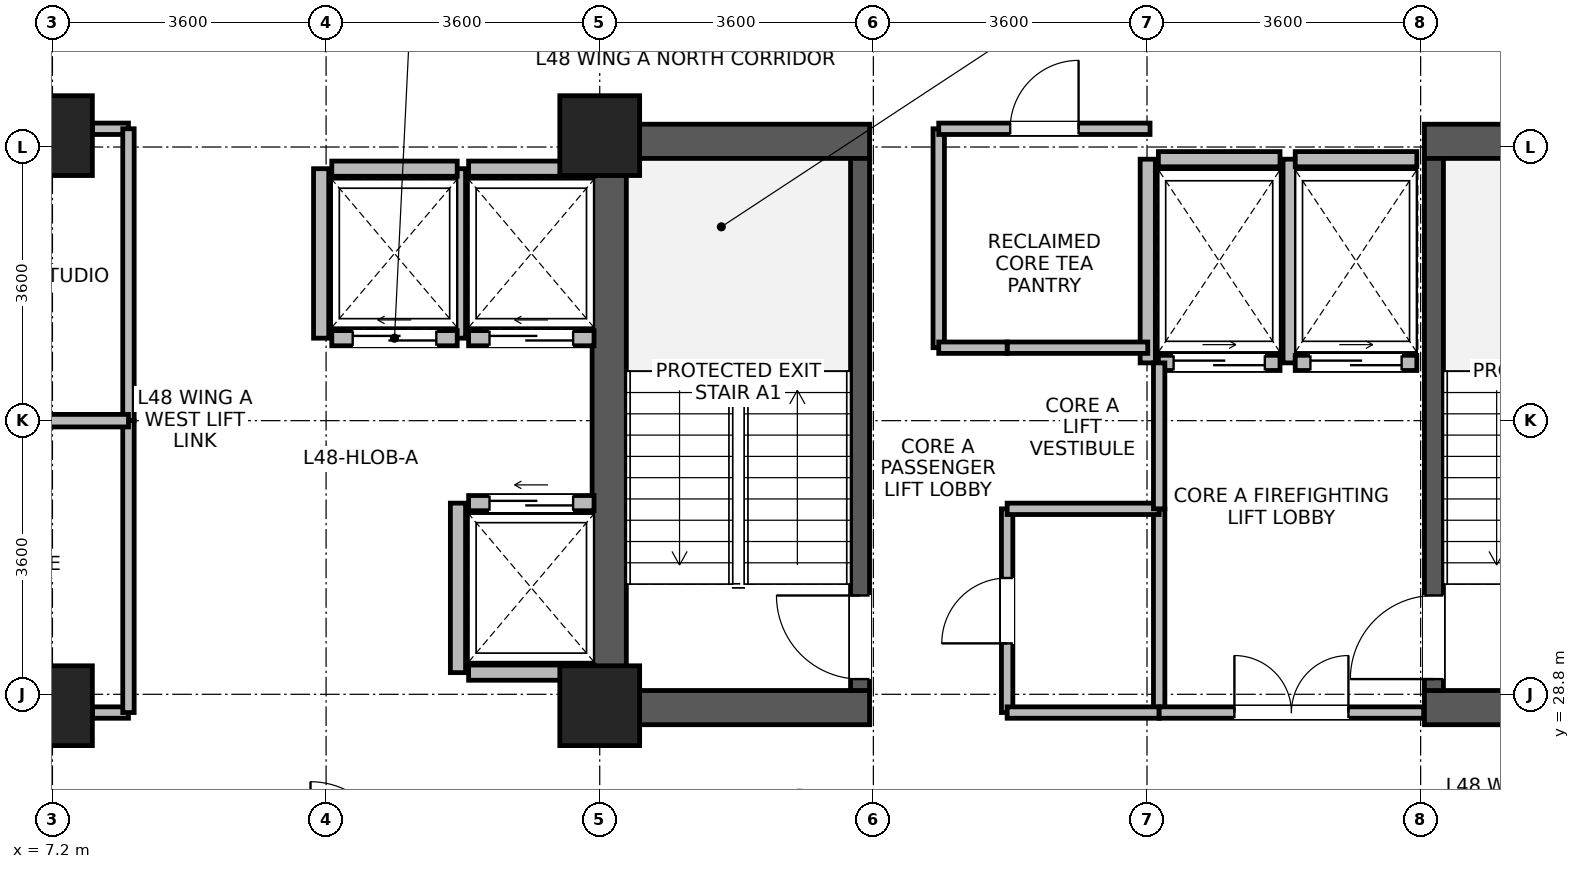
"""IFC4 building model, lengths in metres.
Left out: names, types, materials, properties, quantities, classifications, styles, units other than length and angle.
Written with IfcOpenShell. Run it as: python <this file> out.ifc"""

import sys

from ifc_helpers import new_model, si_unit, direction, frame, frame_2d, origin, origin_2d, place, context, subcontext, project, spatial, rectangle, extrude, source, transform, mapped, element, fill, save


model = new_model("IFC4")
c1 = context("Model", 3, precision=1e-05, world=origin(), true_north=direction((0.0, 1.0)))
c2 = subcontext(c1, "Body", "Model", "MODEL_VIEW")
j1 = project(units=[si_unit("LENGTHUNIT", "METRE"), si_unit("PLANEANGLEUNIT", "RADIAN")], contexts=[c1])
p1 = place(None, origin())
s1 = spatial("IfcSite", under=j1, at=p1, CompositionType="ELEMENT")
p2 = place(p1, origin())
s2 = spatial("IfcBuilding", under=s1, at=p2, CompositionType="ELEMENT")
p3 = place(p2, frame((0.0, 0.0, 188.3)))
s3 = spatial("IfcBuildingStorey", under=s2, at=p3, CompositionType="ELEMENT", Elevation=188.3)
p4 = place(p3, frame((14.525, 28.4, 0.0), z_axis=(0.0, 0.0, 1.0), x_axis=(0.0, 1.0, 0.0)))
e1 = element("IfcWall", 1, at=p4, inside=s3, PredefinedType="SHEAR", context=c2, shape_type="SweptSolid", body=[
    extrude(rectangle(XDim=7.9, YDim=0.45, at=frame_2d((3.95, 0.0))), origin(), (0.0, 0.0, 1.0), 3.34),
])
for number, where, z_axis, x_axis in (
    (2, (14.75, 28.625, 0.0), (0.0, 0.0, 1.0), (1.0, 0.0, 0.0)),
    (3, (25.25, 28.625, 0.0), (0.0, 0.0, 1.0), (1.0, 0.0, 0.0)),
    (4, (14.75, 36.075, 0.0), (0.0, 0.0, 1.0), (1.0, 0.0, 0.0)),
    (5, (25.25, 36.075, 0.0), (0.0, 0.0, 1.0), (1.0, 0.0, 0.0)),
):
    element("IfcWall", number, at=place(p3, frame(where, z_axis=z_axis, x_axis=x_axis)), inside=s3, PredefinedType="SHEAR", context=c2, shape_type="SweptSolid", body=[
        extrude(rectangle(XDim=3.2, YDim=0.45, at=frame_2d((1.6, 0.0))), origin(), (0.0, 0.0, 1.0), 3.34),
    ])
p5 = place(p3, frame((17.825, 28.85, 0.0), z_axis=(0.0, 0.0, 1.0), x_axis=(0.0, 1.0, 0.0)))
e6 = element("IfcWall", 6, at=p5, inside=s3, PredefinedType="SHEAR", context=c2, shape_type="SweptSolid", body=[
    extrude(rectangle(XDim=7.0, YDim=0.25, at=frame_2d((3.5, 0.0))), origin(), (0.0, 0.0, 1.0), 3.34),
])
p6 = place(p5, frame((0.15, 0.0, 0.0)))
e7 = element("IfcOpeningElement", 7, at=p6, cuts=e6, PredefinedType="OPENING", context=c2, shape_type="SweptSolid", body=[
    extrude(rectangle(XDim=1.1, YDim=2.08, at=frame_2d((0.55, 1.04))), frame((0.0, 0.135, 0.0), z_axis=(0.0, -1.0, 0.0), x_axis=(1.0, 0.0, 0.0)), (0.0, 0.0, 1.0), 0.27),
])
p7 = place(p3, frame((25.375, 28.85, 0.0), z_axis=(0.0, 0.0, 1.0), x_axis=(0.0, 1.0, 0.0)))
e8 = element("IfcWall", 8, at=p7, inside=s3, PredefinedType="SHEAR", context=c2, shape_type="SweptSolid", body=[
    extrude(rectangle(XDim=7.0, YDim=0.25, at=frame_2d((3.5, 0.0))), origin(), (0.0, 0.0, 1.0), 3.34),
])
p8 = place(p7, frame((0.15, 0.0, 0.0)))
e9 = element("IfcOpeningElement", 9, at=p8, cuts=e8, PredefinedType="OPENING", context=c2, shape_type="SweptSolid", body=[
    extrude(rectangle(XDim=1.1, YDim=2.08, at=frame_2d((0.55, 1.04))), frame((0.0, 0.135, 0.0), z_axis=(0.0, -1.0, 0.0), x_axis=(1.0, 0.0, 0.0)), (0.0, 0.0, 1.0), 0.27),
])
m1 = source(origin(), c2, "Body", "SweptSolid", [
    extrude(rectangle(XDim=1.05, YDim=1.05, at=origin_2d()), origin(), (0.0, 0.0, 1.0), 3.7),
])
for number, where, z_axis, x_axis in (
    (10, (7.2, 28.65, 0.0), (0.0, 0.0, 1.0), (1.0, 0.0, 0.0)),
    (11, (7.2, 36.15, 0.0), (0.0, 0.0, 1.0), (1.0, 0.0, 0.0)),
    (12, (14.4, 28.65, 0.0), (0.0, 0.0, 1.0), (1.0, 0.0, 0.0)),
    (13, (14.4, 36.15, 0.0), (0.0, 0.0, 1.0), (1.0, 0.0, 0.0)),
):
    element("IfcColumn", number, at=place(p3, frame(where, z_axis=z_axis, x_axis=x_axis)), inside=s3, PredefinedType="COLUMN", context=c2, shape_type="MappedRepresentation", body=[
        mapped(m1, transform((0.0, 0.0, 0.0), x_axis=(1.0, 0.0, 0.0), y_axis=(0.0, 1.0, 0.0), z_axis=(0.0, 0.0, 1.0), scale=1.0)),
    ])
p9 = place(p3, frame((12.675, 33.485, 0.0), z_axis=(0.0, 0.0, 1.0), x_axis=(1.0, 0.0, 0.0)))
e14 = element("IfcWall", 14, at=p9, inside=s3, PredefinedType="PARTITIONING", context=c2, shape_type="SweptSolid", body=[
    extrude(rectangle(XDim=1.65, YDim=0.2, at=frame_2d((0.825, 0.0))), origin(), (0.0, 0.0, 1.0), 3.32),
])
p10 = place(p9, frame((0.275, 0.0, 0.0)))
e15 = element("IfcOpeningElement", 15, at=p10, cuts=e14, PredefinedType="OPENING", context=c2, shape_type="SweptSolid", body=[
    extrude(rectangle(XDim=1.1, YDim=2.12, at=frame_2d((0.55, 1.06))), frame((0.0, 0.11, 0.0), z_axis=(0.0, -1.0, 0.0), x_axis=(1.0, 0.0, 0.0)), (0.0, 0.0, 1.0), 0.22),
])
p11 = place(p3, frame((12.675, 35.715, 0.0), z_axis=(0.0, 0.0, 1.0), x_axis=(1.0, 0.0, 0.0)))
e16 = element("IfcWall", 16, at=p11, inside=s3, PredefinedType="PARTITIONING", context=c2, shape_type="SweptSolid", body=[
    extrude(rectangle(XDim=1.65, YDim=0.2, at=frame_2d((0.825, 0.0))), origin(), (0.0, 0.0, 1.0), 3.32),
])
p12 = place(p3, frame((12.535, 33.485, 0.0), z_axis=(0.0, 0.0, 1.0), x_axis=(0.0, 1.0, 0.0)))
e17 = element("IfcWall", 17, at=p12, inside=s3, PredefinedType="PARTITIONING", context=c2, shape_type="SweptSolid", body=[
    extrude(rectangle(XDim=2.23, YDim=0.2, at=frame_2d((1.115, 0.0))), origin(), (0.0, 0.0, 1.0), 3.32),
])
p13 = place(p3, frame((12.675, 29.085, 0.0), z_axis=(0.0, 0.0, 1.0), x_axis=(1.0, 0.0, 0.0)))
e18 = element("IfcWall", 18, at=p13, inside=s3, PredefinedType="PARTITIONING", context=c2, shape_type="SweptSolid", body=[
    extrude(rectangle(XDim=1.65, YDim=0.2, at=frame_2d((0.825, 0.0))), origin(), (0.0, 0.0, 1.0), 3.32),
])
p14 = place(p3, frame((12.675, 31.315, 0.0), z_axis=(0.0, 0.0, 1.0), x_axis=(1.0, 0.0, 0.0)))
e19 = element("IfcWall", 19, at=p14, inside=s3, PredefinedType="PARTITIONING", context=c2, shape_type="SweptSolid", body=[
    extrude(rectangle(XDim=1.65, YDim=0.2, at=frame_2d((0.825, 0.0))), origin(), (0.0, 0.0, 1.0), 3.32),
])
p15 = place(p14, frame((0.275, 0.0, 0.0)))
e20 = element("IfcOpeningElement", 20, at=p15, cuts=e19, PredefinedType="OPENING", context=c2, shape_type="SweptSolid", body=[
    extrude(rectangle(XDim=1.1, YDim=2.12, at=frame_2d((0.55, 1.06))), frame((0.0, 0.11, 0.0), z_axis=(0.0, -1.0, 0.0), x_axis=(1.0, 0.0, 0.0)), (0.0, 0.0, 1.0), 0.22),
])
p16 = place(p3, frame((12.535, 29.085, 0.0), z_axis=(0.0, 0.0, 1.0), x_axis=(0.0, 1.0, 0.0)))
e21 = element("IfcWall", 21, at=p16, inside=s3, PredefinedType="PARTITIONING", context=c2, shape_type="SweptSolid", body=[
    extrude(rectangle(XDim=2.23, YDim=0.2, at=frame_2d((1.115, 0.0))), origin(), (0.0, 0.0, 1.0), 3.32),
])
p17 = place(p3, frame((10.875, 33.485, 0.0), z_axis=(0.0, 0.0, 1.0), x_axis=(1.0, 0.0, 0.0)))
e22 = element("IfcWall", 22, at=p17, inside=s3, PredefinedType="PARTITIONING", context=c2, shape_type="SweptSolid", body=[
    extrude(rectangle(XDim=1.65, YDim=0.2, at=frame_2d((0.825, 0.0))), origin(), (0.0, 0.0, 1.0), 3.32),
])
p18 = place(p17, frame((0.275, 0.0, 0.0)))
e23 = element("IfcOpeningElement", 23, at=p18, cuts=e22, PredefinedType="OPENING", context=c2, shape_type="SweptSolid", body=[
    extrude(rectangle(XDim=1.1, YDim=2.12, at=frame_2d((0.55, 1.06))), frame((0.0, 0.11, 0.0), z_axis=(0.0, -1.0, 0.0), x_axis=(1.0, 0.0, 0.0)), (0.0, 0.0, 1.0), 0.22),
])
p19 = place(p3, frame((10.875, 35.715, 0.0), z_axis=(0.0, 0.0, 1.0), x_axis=(1.0, 0.0, 0.0)))
e24 = element("IfcWall", 24, at=p19, inside=s3, PredefinedType="PARTITIONING", context=c2, shape_type="SweptSolid", body=[
    extrude(rectangle(XDim=1.65, YDim=0.2, at=frame_2d((0.825, 0.0))), origin(), (0.0, 0.0, 1.0), 3.32),
])
p20 = place(p3, frame((10.735, 33.485, 0.0), z_axis=(0.0, 0.0, 1.0), x_axis=(0.0, 1.0, 0.0)))
e25 = element("IfcWall", 25, at=p20, inside=s3, PredefinedType="PARTITIONING", context=c2, shape_type="SweptSolid", body=[
    extrude(rectangle(XDim=2.23, YDim=0.2, at=frame_2d((1.115, 0.0))), origin(), (0.0, 0.0, 1.0), 3.32),
])
p21 = place(p3, frame((21.75, 33.16, 0.0), z_axis=(0.0, 0.0, 1.0), x_axis=(1.0, 0.0, 0.0)))
e26 = element("IfcWall", 26, at=p21, inside=s3, PredefinedType="PARTITIONING", context=c2, shape_type="SweptSolid", body=[
    extrude(rectangle(XDim=1.6, YDim=0.2, at=frame_2d((0.8, 0.0))), origin(), (0.0, 0.0, 1.0), 3.32),
])
p22 = place(p21, frame((0.2, 0.0, 0.0)))
e27 = element("IfcOpeningElement", 27, at=p22, cuts=e26, PredefinedType="OPENING", context=c2, shape_type="SweptSolid", body=[
    extrude(rectangle(XDim=1.2, YDim=2.12, at=frame_2d((0.6, 1.06))), frame((0.0, 0.11, 0.0), z_axis=(0.0, -1.0, 0.0), x_axis=(1.0, 0.0, 0.0)), (0.0, 0.0, 1.0), 0.22),
])
p23 = place(p3, frame((21.75, 35.84, 0.0), z_axis=(0.0, 0.0, 1.0), x_axis=(1.0, 0.0, 0.0)))
e28 = element("IfcWall", 28, at=p23, inside=s3, PredefinedType="PARTITIONING", context=c2, shape_type="SweptSolid", body=[
    extrude(rectangle(XDim=1.6, YDim=0.2, at=frame_2d((0.8, 0.0))), origin(), (0.0, 0.0, 1.0), 2.32),
])
for number, where, z_axis, x_axis in (
    (29, (21.61, 33.16, 0.0), (0.0, 0.0, 1.0), (0.0, 1.0, 0.0)),
    (30, (23.49, 33.16, 0.0), (0.0, 0.0, 1.0), (0.0, 1.0, 0.0)),
):
    element("IfcWall", number, at=place(p3, frame(where, z_axis=z_axis, x_axis=x_axis)), inside=s3, PredefinedType="PARTITIONING", context=c2, shape_type="SweptSolid", body=[
        extrude(rectangle(XDim=2.68, YDim=0.2, at=frame_2d((1.34, 0.0))), origin(), (0.0, 0.0, 1.0), 3.32),
    ])
p24 = place(p3, frame((23.55, 33.16, 0.0), z_axis=(0.0, 0.0, 1.0), x_axis=(1.0, 0.0, 0.0)))
e31 = element("IfcWall", 31, at=p24, inside=s3, PredefinedType="PARTITIONING", context=c2, shape_type="SweptSolid", body=[
    extrude(rectangle(XDim=1.6, YDim=0.2, at=frame_2d((0.8, 0.0))), origin(), (0.0, 0.0, 1.0), 3.32),
])
p25 = place(p24, frame((0.2, 0.0, 0.0)))
e32 = element("IfcOpeningElement", 32, at=p25, cuts=e31, PredefinedType="OPENING", context=c2, shape_type="SweptSolid", body=[
    extrude(rectangle(XDim=1.2, YDim=2.12, at=frame_2d((0.6, 1.06))), frame((0.0, 0.11, 0.0), z_axis=(0.0, -1.0, 0.0), x_axis=(1.0, 0.0, 0.0)), (0.0, 0.0, 1.0), 0.22),
])
p26 = place(p3, frame((23.55, 35.84, 0.0), z_axis=(0.0, 0.0, 1.0), x_axis=(1.0, 0.0, 0.0)))
e33 = element("IfcWall", 33, at=p26, inside=s3, PredefinedType="PARTITIONING", context=c2, shape_type="SweptSolid", body=[
    extrude(rectangle(XDim=1.6, YDim=0.2, at=frame_2d((0.8, 0.0))), origin(), (0.0, 0.0, 1.0), 2.32),
])
for number, where, z_axis, x_axis in (
    (34, (7.725, 28.56, 0.0), (0.0, 0.0, 1.0), (1.0, 0.0, 0.0)),
    (35, (7.725, 36.24, 0.0), (0.0, 0.0, 1.0), (1.0, 0.0, 0.0)),
):
    element("IfcWall", number, at=place(p3, frame(where, z_axis=z_axis, x_axis=x_axis)), inside=s3, PredefinedType="PARTITIONING", context=c2, shape_type="SweptSolid", body=[
        extrude(rectangle(XDim=0.475, YDim=0.15, at=frame_2d((0.237, 0.0))), origin(), (0.0, 0.0, 1.0), 2.72),
    ])
p27 = place(p3, frame((8.2, 32.4, 0.0), z_axis=(0.0, 0.0, 1.0), x_axis=(0.0, 1.0, 0.0)))
e36 = element("IfcWall", 36, at=p27, inside=s3, PredefinedType="PARTITIONING", context=c2, shape_type="SweptSolid", body=[
    extrude(rectangle(XDim=3.84, YDim=0.15, at=frame_2d((1.92, 0.0))), origin(), (0.0, 0.0, 1.0), 3.32),
])
p28 = place(p3, frame((8.2, 28.56, 0.0), z_axis=(0.0, 0.0, 1.0), x_axis=(0.0, 1.0, 0.0)))
e37 = element("IfcWall", 37, at=p28, inside=s3, PredefinedType="PARTITIONING", context=c2, shape_type="SweptSolid", body=[
    extrude(rectangle(XDim=3.84, YDim=0.15, at=frame_2d((1.92, 0.0))), origin(), (0.0, 0.0, 1.0), 3.32),
])
p29 = place(p3, frame((18.86, 33.36, 0.0), z_axis=(0.0, 0.0, 1.0), x_axis=(0.0, 1.0, 0.0)))
e38 = element("IfcWall", 38, at=p29, inside=s3, PredefinedType="PARTITIONING", context=c2, shape_type="SweptSolid", body=[
    extrude(rectangle(XDim=2.88, YDim=0.15, at=frame_2d((1.44, 0.0))), origin(), (0.0, 0.0, 1.0), 3.32),
])
p30 = place(p3, frame((18.86, 36.24, 0.0), z_axis=(0.0, 0.0, 1.0), x_axis=(1.0, 0.0, 0.0)))
e39 = element("IfcWall", 39, at=p30, inside=s3, PredefinedType="PARTITIONING", context=c2, shape_type="SweptSolid", body=[
    extrude(rectangle(XDim=2.78, YDim=0.15, at=frame_2d((1.39, 0.0))), origin(), (0.0, 0.0, 1.0), 2.32),
])
p31 = place(p30, frame((0.94, 0.0, 0.0)))
e40 = element("IfcOpeningElement", 40, at=p31, cuts=e39, PredefinedType="OPENING", context=c2, shape_type="SweptSolid", body=[
    extrude(rectangle(XDim=0.9, YDim=2.08, at=frame_2d((0.45, 1.04))), frame((0.0, 0.085, 0.0), z_axis=(0.0, -1.0, 0.0), x_axis=(1.0, 0.0, 0.0)), (0.0, 0.0, 1.0), 0.17),
])
p32 = place(p3, frame((19.76, 28.56, 0.0), z_axis=(0.0, 0.0, 1.0), x_axis=(0.0, 1.0, 0.0)))
e41 = element("IfcWall", 41, at=p32, inside=s3, PredefinedType="PARTITIONING", context=c2, shape_type="SweptSolid", body=[
    extrude(rectangle(XDim=2.68, YDim=0.15, at=frame_2d((1.34, 0.0))), origin(), (0.0, 0.0, 1.0), 3.32),
])
p33 = place(p32, frame((0.91, 0.0, 0.0)))
e42 = element("IfcOpeningElement", 42, at=p33, cuts=e41, PredefinedType="OPENING", context=c2, shape_type="SweptSolid", body=[
    extrude(rectangle(XDim=0.86, YDim=2.02, at=frame_2d((0.43, 1.01))), frame((0.0, 0.085, 0.0), z_axis=(0.0, -1.0, 0.0), x_axis=(1.0, 0.0, 0.0)), (0.0, 0.0, 1.0), 0.17),
])
p34 = place(p3, frame((21.76, 28.56, 0.0), z_axis=(0.0, 0.0, 1.0), x_axis=(0.0, 1.0, 0.0)))
e43 = element("IfcWall", 43, at=p34, inside=s3, PredefinedType="PARTITIONING", context=c2, shape_type="SweptSolid", body=[
    extrude(rectangle(XDim=2.68, YDim=0.15, at=frame_2d((1.34, 0.0))), origin(), (0.0, 0.0, 1.0), 3.32),
])
p35 = place(p3, frame((19.76, 28.56, 0.0), z_axis=(0.0, 0.0, 1.0), x_axis=(1.0, 0.0, 0.0)))
e44 = element("IfcWall", 44, at=p35, inside=s3, PredefinedType="PARTITIONING", context=c2, shape_type="SweptSolid", body=[
    extrude(rectangle(XDim=2.0, YDim=0.15, at=frame_2d((1.0, 0.0))), origin(), (0.0, 0.0, 1.0), 2.32),
])
p36 = place(p3, frame((19.76, 31.24, 0.0), z_axis=(0.0, 0.0, 1.0), x_axis=(1.0, 0.0, 0.0)))
e45 = element("IfcWall", 45, at=p36, inside=s3, PredefinedType="PARTITIONING", context=c2, shape_type="SweptSolid", body=[
    extrude(rectangle(XDim=2.0, YDim=0.15, at=frame_2d((1.0, 0.0))), origin(), (0.0, 0.0, 1.0), 3.32),
])
p37 = place(p3, frame((19.76, 33.36, 0.0), z_axis=(0.0, 0.0, 1.0), x_axis=(1.0, 0.0, 0.0)))
e46 = element("IfcWall", 46, at=p37, inside=s3, PredefinedType="PARTITIONING", context=c2, shape_type="SweptSolid", body=[
    extrude(rectangle(XDim=1.85, YDim=0.15, at=frame_2d((0.925, 0.0))), origin(), (0.0, 0.0, 1.0), 3.32),
])
p38 = place(p3, frame((18.86, 33.36, 0.0), z_axis=(0.0, 0.0, 1.0), x_axis=(1.0, 0.0, 0.0)))
e47 = element("IfcWall", 47, at=p38, inside=s3, PredefinedType="PARTITIONING", context=c2, shape_type="SweptSolid", body=[
    extrude(rectangle(XDim=0.9, YDim=0.15, at=frame_2d((0.45, 0.0))), origin(), (0.0, 0.0, 1.0), 3.32),
])
p39 = place(p3, frame((0.632, 32.4, 0.0), z_axis=(0.0, 0.0, 1.0), x_axis=(1.0, 0.0, 0.0)))
e48 = element("IfcWall", 48, at=p39, inside=s3, PredefinedType="PARTITIONING", context=c2, shape_type="SweptSolid", body=[
    extrude(rectangle(XDim=7.568, YDim=0.165, at=frame_2d((3.784, 0.0))), origin(), (0.0, 0.0, 1.0), 3.32),
])
p40 = place(p3, frame((21.76, 28.56, 0.0), z_axis=(0.0, 0.0, 1.0), x_axis=(1.0, 0.0, 0.0)))
e49 = element("IfcWall", 49, at=p40, inside=s3, PredefinedType="PARTITIONING", context=c2, shape_type="SweptSolid", body=[
    extrude(rectangle(XDim=3.48, YDim=0.15, at=frame_2d((1.74, 0.0))), origin(), (0.0, 0.0, 1.0), 2.32),
])
p41 = place(p40, frame((0.99, 0.0, 0.0)))
e50 = element("IfcOpeningElement", 50, at=p41, cuts=e49, PredefinedType="OPENING", context=c2, shape_type="SweptSolid", body=[
    extrude(rectangle(XDim=1.5, YDim=2.1, at=frame_2d((0.75, 1.05))), frame((0.0, 0.085, 0.0), z_axis=(0.0, -1.0, 0.0), x_axis=(1.0, 0.0, 0.0)), (0.0, 0.0, 1.0), 0.17),
])
p42 = place(p3, frame((21.76, 31.24, 0.0), z_axis=(0.0, 0.0, 1.0), x_axis=(0.0, 1.0, 0.0)))
e51 = element("IfcWall", 51, at=p42, inside=s3, PredefinedType="PARTITIONING", context=c2, shape_type="SweptSolid", body=[
    extrude(rectangle(XDim=1.92, YDim=0.15, at=frame_2d((0.96, 0.0))), origin(), (0.0, 0.0, 1.0), 3.32),
])
p43 = place(p6, origin())
e52 = element("IfcDoor", 52, at=p43, inside=s3, OperationType="SINGLE_SWING_RIGHT", PredefinedType="DOOR", context=c2, shape_type="SweptSolid", body=[
    extrude(rectangle(XDim=1.1, YDim=2.08, at=frame_2d((0.55, 1.04))), frame((0.0, 0.025, 0.0), z_axis=(0.0, -1.0, 0.0), x_axis=(1.0, 0.0, 0.0)), (0.0, 0.0, 1.0), 0.05),
])
fill(e7, e52)
p44 = place(p8, origin())
e53 = element("IfcDoor", 53, at=p44, inside=s3, OperationType="SINGLE_SWING_LEFT", PredefinedType="DOOR", context=c2, shape_type="SweptSolid", body=[
    extrude(rectangle(XDim=1.1, YDim=2.08, at=frame_2d((0.55, 1.04))), frame((0.0, 0.025, 0.0), z_axis=(0.0, -1.0, 0.0), x_axis=(1.0, 0.0, 0.0)), (0.0, 0.0, 1.0), 0.05),
])
fill(e9, e53)
p45 = place(p10, origin())
e54 = element("IfcDoor", 54, at=p45, inside=s3, OperationType="SLIDING_TO_LEFT", PredefinedType="DOOR", context=c2, shape_type="SweptSolid", body=[
    extrude(rectangle(XDim=1.1, YDim=2.12, at=frame_2d((0.55, 1.06))), frame((0.0, 0.025, 0.0), z_axis=(0.0, -1.0, 0.0), x_axis=(1.0, 0.0, 0.0)), (0.0, 0.0, 1.0), 0.05),
])
fill(e15, e54)
p46 = place(p15, origin())
e55 = element("IfcDoor", 55, at=p46, inside=s3, OperationType="SLIDING_TO_LEFT", PredefinedType="DOOR", context=c2, shape_type="SweptSolid", body=[
    extrude(rectangle(XDim=1.1, YDim=2.12, at=frame_2d((0.55, 1.06))), frame((0.0, 0.025, 0.0), z_axis=(0.0, -1.0, 0.0), x_axis=(1.0, 0.0, 0.0)), (0.0, 0.0, 1.0), 0.05),
])
fill(e20, e55)
p47 = place(p18, origin())
e56 = element("IfcDoor", 56, at=p47, inside=s3, OperationType="SLIDING_TO_LEFT", PredefinedType="DOOR", context=c2, shape_type="SweptSolid", body=[
    extrude(rectangle(XDim=1.1, YDim=2.12, at=frame_2d((0.55, 1.06))), frame((0.0, 0.025, 0.0), z_axis=(0.0, -1.0, 0.0), x_axis=(1.0, 0.0, 0.0)), (0.0, 0.0, 1.0), 0.05),
])
fill(e23, e56)
p48 = place(p22, origin())
e57 = element("IfcDoor", 57, at=p48, inside=s3, OperationType="SLIDING_TO_RIGHT", PredefinedType="DOOR", context=c2, shape_type="SweptSolid", body=[
    extrude(rectangle(XDim=1.2, YDim=2.12, at=frame_2d((0.6, 1.06))), frame((0.0, 0.025, 0.0), z_axis=(0.0, -1.0, 0.0), x_axis=(1.0, 0.0, 0.0)), (0.0, 0.0, 1.0), 0.05),
])
fill(e27, e57)
p49 = place(p25, origin())
e58 = element("IfcDoor", 58, at=p49, inside=s3, OperationType="SLIDING_TO_RIGHT", PredefinedType="DOOR", context=c2, shape_type="SweptSolid", body=[
    extrude(rectangle(XDim=1.2, YDim=2.12, at=frame_2d((0.6, 1.06))), frame((0.0, 0.025, 0.0), z_axis=(0.0, -1.0, 0.0), x_axis=(1.0, 0.0, 0.0)), (0.0, 0.0, 1.0), 0.05),
])
fill(e32, e58)
p50 = place(p31, origin())
e59 = element("IfcDoor", 59, at=p50, inside=s3, OperationType="SINGLE_SWING_RIGHT", PredefinedType="DOOR", context=c2, shape_type="SweptSolid", body=[
    extrude(rectangle(XDim=0.9, YDim=2.08, at=frame_2d((0.45, 1.04))), frame((0.0, 0.025, 0.0), z_axis=(0.0, -1.0, 0.0), x_axis=(1.0, 0.0, 0.0)), (0.0, 0.0, 1.0), 0.05),
])
fill(e40, e59)
p51 = place(p33, origin())
e60 = element("IfcDoor", 60, at=p51, inside=s3, OperationType="SINGLE_SWING_LEFT", PredefinedType="DOOR", context=c2, shape_type="SweptSolid", body=[
    extrude(rectangle(XDim=0.86, YDim=2.02, at=frame_2d((0.43, 1.01))), frame((0.0, 0.025, 0.0), z_axis=(0.0, -1.0, 0.0), x_axis=(1.0, 0.0, 0.0)), (0.0, 0.0, 1.0), 0.05),
])
fill(e42, e60)
p52 = place(p41, origin())
e61 = element("IfcDoor", 61, at=p52, inside=s3, OperationType="DOUBLE_DOOR_SINGLE_SWING", PredefinedType="DOOR", context=c2, shape_type="SweptSolid", body=[
    extrude(rectangle(XDim=1.5, YDim=2.1, at=frame_2d((0.75, 1.05))), frame((0.0, 0.025, 0.0), z_axis=(0.0, -1.0, 0.0), x_axis=(1.0, 0.0, 0.0)), (0.0, 0.0, 1.0), 0.05),
])
fill(e50, e61)
save(model, sys.argv[1])
